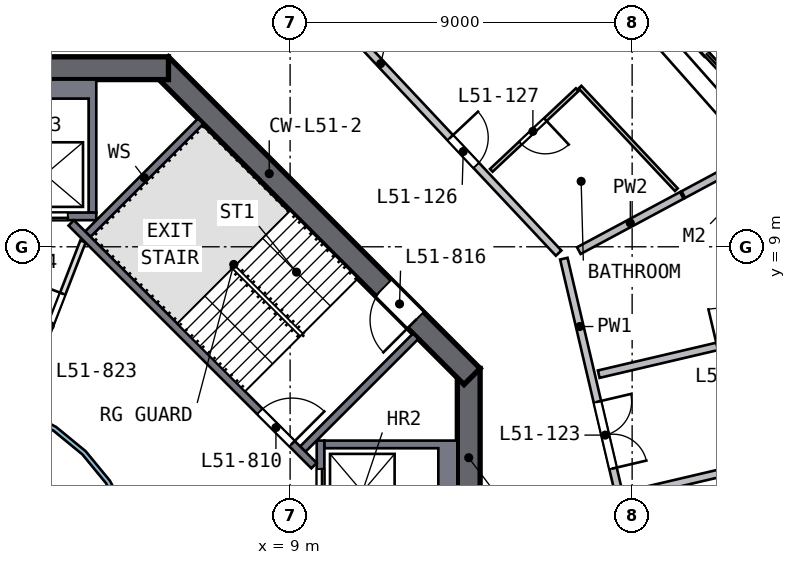
"""IFC4 building model, lengths in metres.
Left out: names, types, materials, properties, quantities, classifications, styles, units other than length and angle.
Written with IfcOpenShell. Run it as: python <this file> out.ifc"""

import sys

from ifc_helpers import new_model, si_unit, direction, frame, frame_2d, origin, place, context, subcontext, project, spatial, polyline, rectangle, outline, extrude, element, fill, save


model = new_model("IFC4")
c1 = context("Model", 3, precision=1e-05, world=origin(), true_north=direction((0.0, 1.0)))
c2 = subcontext(c1, "Body", "Model", "MODEL_VIEW")
j1 = project(units=[si_unit("LENGTHUNIT", "METRE"), si_unit("PLANEANGLEUNIT", "RADIAN")], contexts=[c1])
p1 = place(None, origin())
s1 = spatial("IfcSite", under=j1, at=p1, CompositionType="ELEMENT")
p2 = place(p1, origin())
s2 = spatial("IfcBuilding", under=s1, at=p2, CompositionType="ELEMENT")
p3 = place(p2, frame((0.0, 0.0, 209.0)))
s3 = spatial("IfcBuildingStorey", under=s2, at=p3, CompositionType="ELEMENT", Elevation=209.0)
p4 = place(p3, frame((13.7, -5.799, 0.0), z_axis=(0.0, 0.0, 1.0), x_axis=(0.0, 1.0, 0.0)))
e1 = element("IfcWall", 1, at=p4, inside=s3, PredefinedType="SHEAR", context=c2, shape_type="SweptSolid", body=[
    extrude(rectangle(XDim=11.598, YDim=0.6, at=frame_2d((5.799, 0.0))), origin(), (0.0, 0.0, 1.0), 3.5),
])
p5 = place(p4, frame((4.899, 0.0, 0.0)))
e2 = element("IfcOpeningElement", 2, at=p5, cuts=e1, PredefinedType="OPENING", context=c2, shape_type="SweptSolid", body=[
    extrude(rectangle(XDim=1.8, YDim=2.1, at=frame_2d((0.9, 1.05))), frame((0.0, 0.31, 0.0), z_axis=(0.0, -1.0, 0.0), x_axis=(1.0, 0.0, 0.0)), (0.0, 0.0, 1.0), 0.62),
])
p6 = place(p3, frame((13.788, 5.587, 0.0), z_axis=(0.0, 0.0, 1.0), x_axis=(-0.707106781, 0.707106781, 0.0)))
e3 = element("IfcWall", 3, at=p6, inside=s3, PredefinedType="SHEAR", context=c2, shape_type="SweptSolid", body=[
    extrude(rectangle(XDim=11.598, YDim=0.6, at=frame_2d((5.799, 0.0))), origin(), (0.0, 0.0, 1.0), 3.5),
])
p7 = place(p6, frame((2.099, 0.0, 0.0)))
e4 = element("IfcOpeningElement", 4, at=p7, cuts=e3, PredefinedType="OPENING", context=c2, shape_type="SweptSolid", body=[
    extrude(rectangle(XDim=1.2, YDim=2.1, at=frame_2d((0.6, 1.05))), frame((0.0, 0.31, 0.0), z_axis=(0.0, -1.0, 0.0), x_axis=(1.0, 0.0, 0.0)), (0.0, 0.0, 1.0), 0.62),
])
p8 = place(p3, frame((5.799, 13.7, 0.0), z_axis=(0.0, 0.0, 1.0), x_axis=(-1.0, 0.0, 0.0)))
e5 = element("IfcWall", 5, at=p8, inside=s3, PredefinedType="SHEAR", context=c2, shape_type="SweptSolid", body=[
    extrude(rectangle(XDim=11.598, YDim=0.6, at=frame_2d((5.799, 0.0))), origin(), (0.0, 0.0, 1.0), 3.5),
])
p9 = place(p8, frame((4.899, 0.0, 0.0)))
e6 = element("IfcOpeningElement", 6, at=p9, cuts=e5, PredefinedType="OPENING", context=c2, shape_type="SweptSolid", body=[
    extrude(rectangle(XDim=1.8, YDim=2.1, at=frame_2d((0.9, 1.05))), frame((0.0, 0.31, 0.0), z_axis=(0.0, -1.0, 0.0), x_axis=(1.0, 0.0, 0.0)), (0.0, 0.0, 1.0), 0.62),
])
p10 = place(p3, frame((19.956, 14.076, 0.0), z_axis=(0.0, 0.0, 1.0), x_axis=(-0.684533271, 0.728981619, 0.0)))
e7 = element("IfcWall", 7, at=p10, inside=s3, PredefinedType="SOLIDWALL", context=c2, shape_type="SweptSolid", body=[
    extrude(rectangle(XDim=3.4, YDim=0.15, at=frame_2d((1.7, 0.0))), origin(), (0.0, 0.0, 1.0), 2.475),
])
p11 = place(p10, frame((0.4, 0.0, 0.0)))
e8 = element("IfcOpeningElement", 8, at=p11, cuts=e7, PredefinedType="OPENING", context=c2, shape_type="SweptSolid", body=[
    extrude(rectangle(XDim=2.4, YDim=2.4, at=frame_2d((1.2, 1.2))), frame((0.0, 0.085, 0.0), z_axis=(0.0, -1.0, 0.0), x_axis=(1.0, 0.0, 0.0)), (0.0, 0.0, 1.0), 0.17),
])
p12 = place(p3, origin())
e9 = element("IfcWall", 9, at=p12, inside=s3, PredefinedType="SOLIDWALL", context=c2, shape_type="SweptSolid", body=[
    extrude(outline(polyline([(13.4, 3.9), (13.4, 1.2), (9.9, 1.2), (9.9, 1.4), (12.9, 1.4), (12.9, 3.7), (9.9, 3.7), (9.9, 3.9), (13.4, 3.9)])), origin(), (0.0, 0.0, 1.0), 3.19),
])
p13 = place(p3, frame((9.8, 1.2, 0.0), z_axis=(0.0, 0.0, 1.0), x_axis=(0.0, 1.0, 0.0)))
e10 = element("IfcWall", 10, at=p13, inside=s3, PredefinedType="SOLIDWALL", context=c2, shape_type="SweptSolid", body=[
    extrude(rectangle(XDim=2.7, YDim=0.2, at=frame_2d((1.35, 0.0))), origin(), (0.0, 0.0, 1.0), 3.19),
])
p14 = place(p13, frame((0.75, 0.0, 0.0)))
e11 = element("IfcOpeningElement", 11, at=p14, cuts=e10, PredefinedType="OPENING", context=c2, shape_type="SweptSolid", body=[
    extrude(rectangle(XDim=1.2, YDim=2.1, at=frame_2d((0.6, 1.05))), frame((0.0, 0.11, 0.0), z_axis=(0.0, -1.0, 0.0), x_axis=(1.0, 0.0, 0.0)), (0.0, 0.0, 1.0), 0.22),
])
p15 = place(p3, origin())
e12 = element("IfcWall", 12, at=p15, inside=s3, PredefinedType="SOLIDWALL", context=c2, shape_type="SweptSolid", body=[
    extrude(outline(polyline([(3.9, 9.9), (3.7, 9.9), (3.7, 12.9), (1.4, 12.9), (1.4, 9.9), (1.2, 9.9), (1.2, 13.4), (3.9, 13.4), (3.9, 9.9)])), origin(), (0.0, 0.0, 1.0), 3.19),
])
p16 = place(p3, frame((1.2, 9.8, 0.0), z_axis=(0.0, 0.0, 1.0), x_axis=(1.0, 0.0, 0.0)))
e13 = element("IfcWall", 13, at=p16, inside=s3, PredefinedType="SOLIDWALL", context=c2, shape_type="SweptSolid", body=[
    extrude(rectangle(XDim=2.7, YDim=0.2, at=frame_2d((1.35, 0.0))), origin(), (0.0, 0.0, 1.0), 3.19),
])
p17 = place(p16, frame((0.75, 0.0, 0.0)))
e14 = element("IfcOpeningElement", 14, at=p17, cuts=e13, PredefinedType="OPENING", context=c2, shape_type="SweptSolid", body=[
    extrude(rectangle(XDim=1.2, YDim=2.1, at=frame_2d((0.6, 1.05))), frame((0.0, 0.11, 0.0), z_axis=(0.0, -1.0, 0.0), x_axis=(1.0, 0.0, 0.0)), (0.0, 0.0, 1.0), 0.22),
])
p18 = place(p3, frame((3.24, 9.629, 0.0), z_axis=(0.0, 0.0, 1.0), x_axis=(0.707106781, -0.707106781, 0.0)))
e15 = element("IfcWall", 15, at=p18, inside=s3, PredefinedType="SOLIDWALL", context=c2, shape_type="SweptSolid", body=[
    extrude(rectangle(XDim=9.036, YDim=0.2, at=frame_2d((4.518, 0.0))), origin(), (0.0, 0.0, 1.0), 3.19),
])
p19 = place(p18, frame((7.018, 0.0, 0.0)))
e16 = element("IfcOpeningElement", 16, at=p19, cuts=e15, PredefinedType="OPENING", context=c2, shape_type="SweptSolid", body=[
    extrude(rectangle(XDim=1.2, YDim=2.1, at=frame_2d((0.6, 1.05))), frame((0.0, 0.11, 0.0), z_axis=(0.0, -1.0, 0.0), x_axis=(1.0, 0.0, 0.0)), (0.0, 0.0, 1.0), 0.22),
])
for number, where, z_axis, x_axis in (
    (17, (9.334, 3.677, 0.0), (0.0, 0.0, 1.0), (0.707, 0.707, 0.0)),
    (18, (3.677, 9.334, 0.0), (0.0, 0.0, 1.0), (0.707, 0.707, 0.0)),
):
    element("IfcWall", number, at=place(p3, frame(where, z_axis=z_axis, x_axis=x_axis)), inside=s3, PredefinedType="SOLIDWALL", context=c2, shape_type="SweptSolid", body=[
        extrude(rectangle(XDim=4.2, YDim=0.2, at=frame_2d((2.1, 0.0))), origin(), (0.0, 0.0, 1.0), 3.19),
    ])
p20 = place(p3, frame((1.857, 4.782, 0.0), z_axis=(0.0, 0.0, 1.0), x_axis=(0.362053096, 0.932157474, 0.0)))
e19 = element("IfcWall", 19, at=p20, inside=s3, PredefinedType="PARTITIONING", context=c2, shape_type="SweptSolid", body=[
    extrude(rectangle(XDim=4.675, YDim=0.15, at=frame_2d((2.337, 0.0))), origin(), (0.0, 0.0, 1.0), 3.19),
])
p21 = place(p20, frame((1.4, 0.0, 0.0)))
e20 = element("IfcOpeningElement", 20, at=p21, cuts=e19, PredefinedType="OPENING", context=c2, shape_type="SweptSolid", body=[
    extrude(rectangle(XDim=1.8, YDim=2.1, at=frame_2d((0.9, 1.05))), frame((0.0, 0.085, 0.0), z_axis=(0.0, -1.0, 0.0), x_axis=(1.0, 0.0, 0.0)), (0.0, 0.0, 1.0), 0.17),
])
p22 = place(p3, origin())
e21 = element("IfcWall", 21, at=p22, inside=s3, PredefinedType="SOLIDWALL", context=c2, shape_type="SweptSolid", body=[
    extrude(outline(polyline([(5.021, -0.999), (4.73, -1.959), (4.257, -2.844), (3.62, -3.62), (2.844, -4.257), (1.959, -4.73), (0.999, -5.021), (0.0, -5.12), (-0.999, -5.021), (-1.959, -4.73), (-2.844, -4.257), (-3.62, -3.62), (-4.257, -2.844), (-4.73, -1.959), (-5.021, -0.999), (-5.12, 0.0), (-5.021, 0.999), (-4.73, 1.959), (-4.257, 2.844), (-3.62, 3.62), (-2.844, 4.257), (-1.959, 4.73), (-0.999, 5.021), (0.0, 5.12), (0.999, 5.021), (1.959, 4.73), (2.844, 4.257), (3.62, 3.62), (4.257, 2.844), (4.73, 1.959), (5.021, 0.999), (5.12, 0.0), (5.021, -0.999)]), holes=[polyline([(4.904, 0.976), (4.619, 1.913), (4.157, 2.778), (3.535, 3.535), (2.778, 4.157), (1.913, 4.619), (0.976, 4.904), (0.0, 5.0), (-0.976, 4.904), (-1.913, 4.619), (-2.778, 4.157), (-3.535, 3.535), (-4.157, 2.778), (-4.619, 1.913), (-4.904, 0.976), (-5.0, 0.0), (-4.904, -0.976), (-4.619, -1.913), (-4.157, -2.778), (-3.535, -3.535), (-2.778, -4.157), (-1.913, -4.619), (-0.976, -4.904), (0.0, -5.0), (0.976, -4.904), (1.913, -4.619), (2.778, -4.157), (3.535, -3.535), (4.157, -2.778), (4.619, -1.913), (4.904, -0.976), (5.0, 0.0), (4.904, 0.976)])]), origin(), (0.0, 0.0, 1.0), 3.19),
])
p23 = place(p3, frame((9.688, 15.625, 0.0), z_axis=(0.0, 0.0, 1.0), x_axis=(0.684549323, -0.728966545, 0.0)))
e22 = element("IfcWall", 22, at=p23, inside=s3, PredefinedType="SOLIDWALL", context=c2, shape_type="SweptSolid", body=[
    extrude(rectangle(XDim=9.317, YDim=0.2, at=frame_2d((4.658, 0.0))), origin(), (0.0, 0.0, 1.0), 3.19),
])
p24 = place(p23, frame((5.15, 0.0, 0.0)))
e23 = element("IfcOpeningElement", 23, at=p24, cuts=e22, PredefinedType="OPENING", context=c2, shape_type="SweptSolid", body=[
    extrude(rectangle(XDim=1.0, YDim=2.1, at=frame_2d((0.5, 1.05))), frame((0.0, 0.11, 0.0), z_axis=(0.0, -1.0, 0.0), x_axis=(1.0, 0.0, 0.0)), (0.0, 0.0, 1.0), 0.22),
])
p25 = place(p3, frame((16.203, 8.688, 0.0), z_axis=(0.0, 0.0, 1.0), x_axis=(0.228346959, -0.97357982, 0.0)))
e24 = element("IfcWall", 24, at=p25, inside=s3, PredefinedType="SOLIDWALL", context=c2, shape_type="SweptSolid", body=[
    extrude(rectangle(XDim=9.317, YDim=0.2, at=frame_2d((4.658, 0.0))), origin(), (0.0, 0.0, 1.0), 3.19),
])
p26 = place(p25, frame((3.869, 0.0, 0.0)))
e25 = element("IfcOpeningElement", 25, at=p26, cuts=e24, PredefinedType="OPENING", context=c2, shape_type="SweptSolid", body=[
    extrude(rectangle(XDim=1.8, YDim=2.1, at=frame_2d((0.9, 1.05))), frame((0.0, 0.11, 0.0), z_axis=(0.0, -1.0, 0.0), x_axis=(1.0, 0.0, 0.0)), (0.0, 0.0, 1.0), 0.22),
])
p27 = place(p3, frame((16.597, 8.899, 0.0), z_axis=(0.0, 0.0, 1.0), x_axis=(0.88131111, 0.472536482, 0.0)))
e26 = element("IfcWall", 26, at=p27, inside=s3, PredefinedType="SOLIDWALL", context=c2, shape_type="SweptSolid", body=[
    extrude(rectangle(XDim=3.075, YDim=0.2, at=frame_2d((1.537, 0.0))), origin(), (0.0, 0.0, 1.0), 3.19),
])
p28 = place(p3, frame((19.347, 10.374, 0.0), z_axis=(0.0, 0.0, 1.0), x_axis=(0.881302745, 0.472552084, 0.0)))
e27 = element("IfcWall", 27, at=p28, inside=s3, PredefinedType="SOLIDWALL", context=c2, shape_type="SweptSolid", body=[
    extrude(rectangle(XDim=3.011, YDim=0.2, at=frame_2d((1.506, 0.0))), origin(), (0.0, 0.0, 1.0), 3.19),
])
p29 = place(p3, frame((17.121, 5.648, 0.0), z_axis=(0.0, 0.0, 1.0), x_axis=(0.973576876, 0.22835951, 0.0)))
e28 = element("IfcWall", 28, at=p29, inside=s3, PredefinedType="SOLIDWALL", context=c2, shape_type="SweptSolid", body=[
    extrude(rectangle(XDim=10.75, YDim=0.2, at=frame_2d((5.375, 0.0))), origin(), (0.0, 0.0, 1.0), 3.19),
])
p30 = place(p29, frame((3.2, 0.0, 0.0)))
e29 = element("IfcOpeningElement", 29, at=p30, cuts=e28, PredefinedType="OPENING", context=c2, shape_type="SweptSolid", body=[
    extrude(rectangle(XDim=1.0, YDim=2.1, at=frame_2d((0.5, 1.05))), frame((0.0, 0.11, 0.0), z_axis=(0.0, -1.0, 0.0), x_axis=(1.0, 0.0, 0.0)), (0.0, 0.0, 1.0), 0.22),
])
p31 = place(p3, frame((28.333, 4.924, 0.0), z_axis=(0.0, 0.0, 1.0), x_axis=(-0.973578061, -0.228354461, 0.0)))
e30 = element("IfcWall", 30, at=p31, inside=s3, PredefinedType="SOLIDWALL", context=c2, shape_type="SweptSolid", body=[
    extrude(rectangle(XDim=10.75, YDim=0.2, at=frame_2d((5.375, 0.0))), origin(), (0.0, 0.0, 1.0), 2.69),
])
p32 = place(p31, frame((1.95, 0.0, 0.0)))
e31 = element("IfcOpeningElement", 31, at=p32, cuts=e30, PredefinedType="OPENING", context=c2, shape_type="SweptSolid", body=[
    extrude(rectangle(XDim=1.0, YDim=2.1, at=frame_2d((0.5, 1.05))), frame((0.0, 0.11, 0.0), z_axis=(0.0, -1.0, 0.0), x_axis=(1.0, 0.0, 0.0)), (0.0, 0.0, 1.0), 0.22),
])
p33 = place(p3, frame((16.554, 13.134, 0.0), z_axis=(0.0, 0.0, 1.0), x_axis=(-0.728967156, -0.684548673, 0.0)))
e32 = element("IfcWall", 32, at=p33, inside=s3, PredefinedType="PARTITIONING", context=c2, shape_type="SweptSolid", body=[
    extrude(rectangle(XDim=3.1, YDim=0.1, at=frame_2d((1.55, 0.0))), origin(), (0.0, 0.0, 1.0), 3.19),
])
p34 = place(p33, frame((1.15, 0.0, 0.0)))
e33 = element("IfcOpeningElement", 33, at=p34, cuts=e32, PredefinedType="OPENING", context=c2, shape_type="SweptSolid", body=[
    extrude(rectangle(XDim=0.9, YDim=2.1, at=frame_2d((0.45, 1.05))), frame((0.0, 0.06, 0.0), z_axis=(0.0, -1.0, 0.0), x_axis=(1.0, 0.0, 0.0)), (0.0, 0.0, 1.0), 0.12),
])
p35 = place(p3, frame((16.627, 13.202, 0.0), z_axis=(0.0, 0.0, 1.0), x_axis=(0.684546009, -0.728969657, 0.0)))
e34 = element("IfcWall", 34, at=p35, inside=s3, PredefinedType="PARTITIONING", context=c2, shape_type="SweptSolid", body=[
    extrude(rectangle(XDim=3.704, YDim=0.1, at=frame_2d((1.852, 0.0))), origin(), (0.0, 0.0, 1.0), 3.19),
])
p36 = place(p14, origin())
e35 = element("IfcDoor", 35, at=p36, inside=s3, OperationType="DOUBLE_DOOR_SLIDING", PredefinedType="DOOR", context=c2, shape_type="SweptSolid", body=[
    extrude(rectangle(XDim=1.2, YDim=2.1, at=frame_2d((0.6, 1.05))), frame((0.0, 0.025, 0.0), z_axis=(0.0, -1.0, 0.0), x_axis=(1.0, 0.0, 0.0)), (0.0, 0.0, 1.0), 0.05),
])
fill(e11, e35)
p37 = place(p17, origin())
e36 = element("IfcDoor", 36, at=p37, inside=s3, OperationType="DOUBLE_DOOR_SLIDING", PredefinedType="DOOR", context=c2, shape_type="SweptSolid", body=[
    extrude(rectangle(XDim=1.2, YDim=2.1, at=frame_2d((0.6, 1.05))), frame((0.0, 0.025, 0.0), z_axis=(0.0, -1.0, 0.0), x_axis=(1.0, 0.0, 0.0)), (0.0, 0.0, 1.0), 0.05),
])
fill(e14, e36)
p38 = place(p19, origin())
e37 = element("IfcDoor", 37, at=p38, inside=s3, OperationType="SINGLE_SWING_RIGHT", PredefinedType="DOOR", context=c2, shape_type="SweptSolid", body=[
    extrude(rectangle(XDim=1.2, YDim=2.1, at=frame_2d((0.6, 1.05))), frame((0.0, 0.025, 0.0), z_axis=(0.0, -1.0, 0.0), x_axis=(1.0, 0.0, 0.0)), (0.0, 0.0, 1.0), 0.05),
])
fill(e16, e37)
p39 = place(p7, origin())
e38 = element("IfcDoor", 38, at=p39, inside=s3, OperationType="SINGLE_SWING_LEFT", PredefinedType="DOOR", context=c2, shape_type="SweptSolid", body=[
    extrude(rectangle(XDim=1.2, YDim=2.1, at=frame_2d((0.6, 1.05))), frame((0.0, 0.025, 0.0), z_axis=(0.0, -1.0, 0.0), x_axis=(1.0, 0.0, 0.0)), (0.0, 0.0, 1.0), 0.05),
])
fill(e4, e38)
p40 = place(p21, origin())
e39 = element("IfcDoor", 39, at=p40, inside=s3, OperationType="DOUBLE_DOOR_SINGLE_SWING", PredefinedType="DOOR", context=c2, shape_type="SweptSolid", body=[
    extrude(rectangle(XDim=1.8, YDim=2.1, at=frame_2d((0.9, 1.05))), frame((0.0, 0.025, 0.0), z_axis=(0.0, -1.0, 0.0), x_axis=(1.0, 0.0, 0.0)), (0.0, 0.0, 1.0), 0.05),
])
fill(e20, e39)
p41 = place(p26, origin())
e40 = element("IfcDoor", 40, at=p41, inside=s3, OperationType="DOUBLE_DOOR_SINGLE_SWING", PredefinedType="DOOR", context=c2, shape_type="SweptSolid", body=[
    extrude(rectangle(XDim=1.8, YDim=2.1, at=frame_2d((0.9, 1.05))), frame((0.0, 0.025, 0.0), z_axis=(0.0, -1.0, 0.0), x_axis=(1.0, 0.0, 0.0)), (0.0, 0.0, 1.0), 0.05),
])
fill(e25, e40)
p42 = place(p30, origin())
e41 = element("IfcDoor", 41, at=p42, inside=s3, OperationType="SINGLE_SWING_LEFT", PredefinedType="DOOR", context=c2, shape_type="SweptSolid", body=[
    extrude(rectangle(XDim=1.0, YDim=2.1, at=frame_2d((0.5, 1.05))), frame((0.0, 0.025, 0.0), z_axis=(0.0, -1.0, 0.0), x_axis=(1.0, 0.0, 0.0)), (0.0, 0.0, 1.0), 0.05),
])
fill(e29, e41)
p43 = place(p24, origin())
e42 = element("IfcDoor", 42, at=p43, inside=s3, OperationType="SINGLE_SWING_LEFT", PredefinedType="DOOR", context=c2, shape_type="SweptSolid", body=[
    extrude(rectangle(XDim=1.0, YDim=2.1, at=frame_2d((0.5, 1.05))), frame((0.0, 0.025, 0.0), z_axis=(0.0, -1.0, 0.0), x_axis=(1.0, 0.0, 0.0)), (0.0, 0.0, 1.0), 0.05),
])
fill(e23, e42)
p44 = place(p34, origin())
e43 = element("IfcDoor", 43, at=p44, inside=s3, OperationType="SINGLE_SWING_LEFT", PredefinedType="DOOR", context=c2, shape_type="SweptSolid", body=[
    extrude(rectangle(XDim=0.9, YDim=2.1, at=frame_2d((0.45, 1.05))), frame((0.0, 0.025, 0.0), z_axis=(0.0, -1.0, 0.0), x_axis=(1.0, 0.0, 0.0)), (0.0, 0.0, 1.0), 0.05),
])
fill(e33, e43)
save(model, sys.argv[1])
